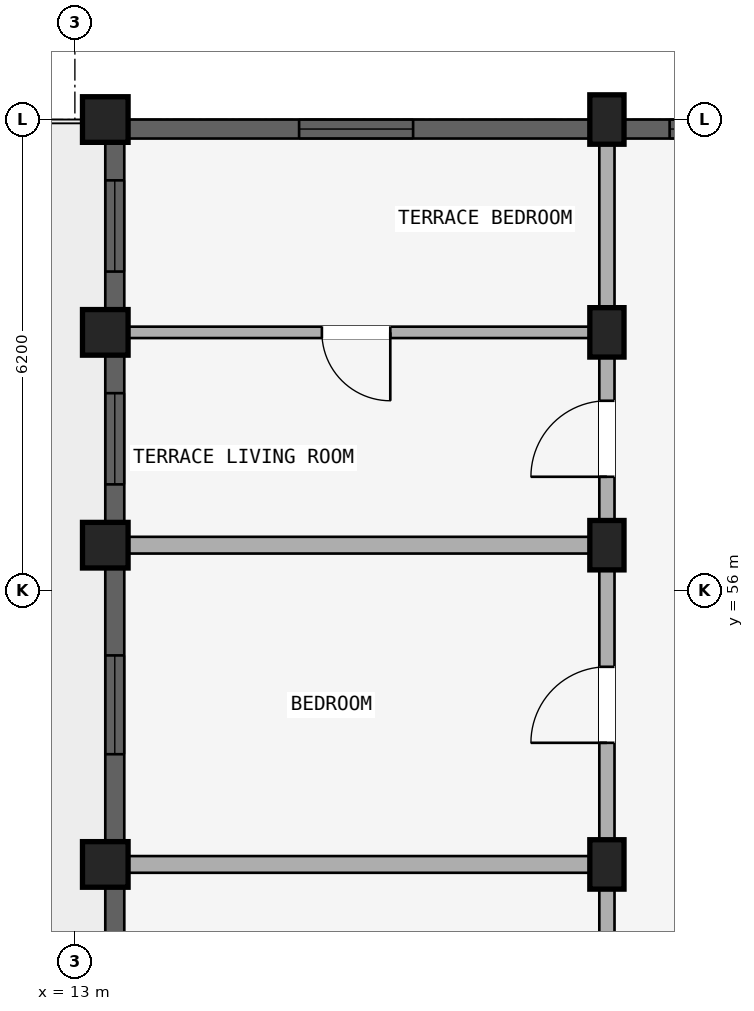
"""IFC4 building model, lengths in metres.
Left out: names, types, materials, properties, quantities, classifications, styles, units other than length and angle.
Written with IfcOpenShell. Run it as: python <this file> out.ifc"""

import sys

from ifc_helpers import new_model, si_unit, direction, frame, frame_2d, origin, origin_2d, place, context, subcontext, project, spatial, rectangle, extrude, element, fill, save


model = new_model("IFC4")
c1 = context("Model", 3, precision=1e-05, world=origin(), true_north=direction((0.0, 1.0)))
c2 = subcontext(c1, "Body", "Model", "MODEL_VIEW")
j1 = project(units=[si_unit("LENGTHUNIT", "METRE"), si_unit("PLANEANGLEUNIT", "RADIAN")], contexts=[c1])
p1 = place(None, origin())
s1 = spatial("IfcSite", under=j1, at=p1, CompositionType="ELEMENT")
p2 = place(p1, origin())
s2 = spatial("IfcBuilding", under=s1, at=p2, CompositionType="ELEMENT")
p3 = place(p2, frame((0.0, 0.0, 30.75)))
s3 = spatial("IfcBuildingStorey", under=s2, at=p3, CompositionType="ELEMENT", Elevation=30.75)
p4 = place(p3, frame((20.0, 52.4, 0.0), z_axis=(0.0, 0.0, 1.0), x_axis=(1.0, 0.0, 0.0)))
e1 = element("IfcColumn", 1, at=p4, inside=s3, PredefinedType="COLUMN", context=c2, shape_type="SweptSolid", body=[
    extrude(rectangle(XDim=0.45, YDim=0.65, at=origin_2d()), origin(), (0.0, 0.0, 1.0), 2.91),
])
p5 = place(p3, frame((13.4, 52.4, 0.0), z_axis=(0.0, 0.0, 1.0), x_axis=(1.0, 0.0, 0.0)))
e2 = element("IfcColumn", 2, at=p5, inside=s3, PredefinedType="COLUMN", context=c2, shape_type="SweptSolid", body=[
    extrude(rectangle(XDim=0.6, YDim=0.6, at=origin_2d()), origin(), (0.0, 0.0, 1.0), 2.91),
])
p6 = place(p3, frame((20.0, 56.6, 0.0), z_axis=(0.0, 0.0, 1.0), x_axis=(1.0, 0.0, 0.0)))
e3 = element("IfcColumn", 3, at=p6, inside=s3, PredefinedType="COLUMN", context=c2, shape_type="SweptSolid", body=[
    extrude(rectangle(XDim=0.45, YDim=0.65, at=origin_2d()), origin(), (0.0, 0.0, 1.0), 2.91),
])
p7 = place(p3, frame((13.4, 56.6, 0.0), z_axis=(0.0, 0.0, 1.0), x_axis=(1.0, 0.0, 0.0)))
e4 = element("IfcColumn", 4, at=p7, inside=s3, PredefinedType="COLUMN", context=c2, shape_type="SweptSolid", body=[
    extrude(rectangle(XDim=0.6, YDim=0.6, at=origin_2d()), origin(), (0.0, 0.0, 1.0), 2.91),
])
p8 = place(p3, frame((20.0, 59.4, 0.0), z_axis=(0.0, 0.0, 1.0), x_axis=(1.0, 0.0, 0.0)))
e5 = element("IfcColumn", 5, at=p8, inside=s3, PredefinedType="COLUMN", context=c2, shape_type="SweptSolid", body=[
    extrude(rectangle(XDim=0.45, YDim=0.65, at=origin_2d()), origin(), (0.0, 0.0, 1.0), 2.91),
])
p9 = place(p3, frame((13.4, 59.4, 0.0), z_axis=(0.0, 0.0, 1.0), x_axis=(1.0, 0.0, 0.0)))
e6 = element("IfcColumn", 6, at=p9, inside=s3, PredefinedType="COLUMN", context=c2, shape_type="SweptSolid", body=[
    extrude(rectangle(XDim=0.6, YDim=0.6, at=origin_2d()), origin(), (0.0, 0.0, 1.0), 2.91),
])
p10 = place(p3, frame((20.0, 62.2, 0.0), z_axis=(0.0, 0.0, 1.0), x_axis=(1.0, 0.0, 0.0)))
e7 = element("IfcColumn", 7, at=p10, inside=s3, PredefinedType="COLUMN", context=c2, shape_type="SweptSolid", body=[
    extrude(rectangle(XDim=0.45, YDim=0.65, at=origin_2d()), origin(), (0.0, 0.0, 1.0), 2.91),
])
p11 = place(p3, frame((13.4, 62.2, 0.0), z_axis=(0.0, 0.0, 1.0), x_axis=(1.0, 0.0, 0.0)))
e8 = element("IfcColumn", 8, at=p11, inside=s3, PredefinedType="COLUMN", context=c2, shape_type="SweptSolid", body=[
    extrude(rectangle(XDim=0.6, YDim=0.6, at=origin_2d()), origin(), (0.0, 0.0, 1.0), 2.91),
])
p12 = place(p3, frame((20.0, 48.35, 0.0), z_axis=(0.0, 0.0, 1.0), x_axis=(0.0, 1.0, 0.0)))
e9 = element("IfcWall", 9, at=p12, inside=s3, PredefinedType="STANDARD", context=c2, shape_type="SweptSolid", body=[
    extrude(rectangle(XDim=4.05, YDim=0.2, at=frame_2d((2.025, 0.0))), origin(), (0.0, 0.0, 1.0), 2.352),
])
p13 = place(p12, frame((1.525, 0.0, 0.0)))
e10 = element("IfcOpeningElement", 10, at=p13, cuts=e9, PredefinedType="OPENING", context=c2, shape_type="SweptSolid", body=[
    extrude(rectangle(XDim=1.0, YDim=2.15, at=frame_2d((0.5, 1.075))), frame((0.0, 0.11, 0.0), z_axis=(0.0, -1.0, 0.0), x_axis=(1.0, 0.0, 0.0)), (0.0, 0.0, 1.0), 0.22),
])
p14 = place(p3, frame((20.0, 52.4, 0.0), z_axis=(0.0, 0.0, 1.0), x_axis=(0.0, 1.0, 0.0)))
e11 = element("IfcWall", 11, at=p14, inside=s3, PredefinedType="STANDARD", context=c2, shape_type="SweptSolid", body=[
    extrude(rectangle(XDim=4.2, YDim=0.2, at=frame_2d((2.1, 0.0))), origin(), (0.0, 0.0, 1.0), 2.352),
])
p15 = place(p14, frame((1.6, 0.0, 0.0)))
e12 = element("IfcOpeningElement", 12, at=p15, cuts=e11, PredefinedType="OPENING", context=c2, shape_type="SweptSolid", body=[
    extrude(rectangle(XDim=1.0, YDim=2.15, at=frame_2d((0.5, 1.075))), frame((0.0, 0.11, 0.0), z_axis=(0.0, -1.0, 0.0), x_axis=(1.0, 0.0, 0.0)), (0.0, 0.0, 1.0), 0.22),
])
p16 = place(p3, frame((19.95, 52.4, 0.0), z_axis=(0.0, 0.0, 1.0), x_axis=(-1.0, 0.0, 0.0)))
e13 = element("IfcWall", 13, at=p16, inside=s3, PredefinedType="STANDARD", context=c2, shape_type="SweptSolid", body=[
    extrude(rectangle(XDim=6.33, YDim=0.22, at=frame_2d((3.165, 0.0))), origin(), (0.0, 0.0, 1.0), 2.352),
])
p17 = place(p3, frame((20.0, 56.6, 0.0), z_axis=(0.0, 0.0, 1.0), x_axis=(0.0, 1.0, 0.0)))
e14 = element("IfcWall", 14, at=p17, inside=s3, PredefinedType="STANDARD", context=c2, shape_type="SweptSolid", body=[
    extrude(rectangle(XDim=2.8, YDim=0.2, at=frame_2d((1.4, 0.0))), origin(), (0.0, 0.0, 1.0), 2.352),
])
p18 = place(p17, frame((0.9, 0.0, 0.0)))
e15 = element("IfcOpeningElement", 15, at=p18, cuts=e14, PredefinedType="OPENING", context=c2, shape_type="SweptSolid", body=[
    extrude(rectangle(XDim=1.0, YDim=2.15, at=frame_2d((0.5, 1.075))), frame((0.0, 0.11, 0.0), z_axis=(0.0, -1.0, 0.0), x_axis=(1.0, 0.0, 0.0)), (0.0, 0.0, 1.0), 0.22),
])
p19 = place(p3, frame((19.9, 56.6, 0.0), z_axis=(0.0, 0.0, 1.0), x_axis=(-1.0, 0.0, 0.0)))
e16 = element("IfcWall", 16, at=p19, inside=s3, PredefinedType="STANDARD", context=c2, shape_type="SweptSolid", body=[
    extrude(rectangle(XDim=6.22, YDim=0.22, at=frame_2d((3.11, 0.0))), origin(), (0.0, 0.0, 1.0), 2.352),
])
p20 = place(p3, frame((20.0, 59.4, 0.0), z_axis=(0.0, 0.0, 1.0), x_axis=(0.0, 1.0, 0.0)))
e17 = element("IfcWall", 17, at=p20, inside=s3, PredefinedType="STANDARD", context=c2, shape_type="SweptSolid", body=[
    extrude(rectangle(XDim=2.8, YDim=0.2, at=frame_2d((1.4, 0.0))), origin(), (0.0, 0.0, 1.0), 2.352),
])
p21 = place(p3, frame((19.9, 59.4, 0.0), z_axis=(0.0, 0.0, 1.0), x_axis=(-1.0, 0.0, 0.0)))
e18 = element("IfcWall", 18, at=p21, inside=s3, PredefinedType="PARTITIONING", context=c2, shape_type="SweptSolid", body=[
    extrude(rectangle(XDim=6.22, YDim=0.15, at=frame_2d((3.11, 0.0))), origin(), (0.0, 0.0, 1.0), 2.352),
])
p22 = place(p21, frame((2.75, 0.0, 0.0)))
e19 = element("IfcOpeningElement", 19, at=p22, cuts=e18, PredefinedType="OPENING", context=c2, shape_type="SweptSolid", body=[
    extrude(rectangle(XDim=0.9, YDim=2.1, at=frame_2d((0.45, 1.05))), frame((0.0, 0.085, 0.0), z_axis=(0.0, -1.0, 0.0), x_axis=(1.0, 0.0, 0.0)), (0.0, 0.0, 1.0), 0.17),
])
p23 = place(p3, frame((13.525, 48.503, 0.0), z_axis=(0.0, 0.0, 1.0), x_axis=(0.0, 1.0, 0.0)))
e20 = element("IfcWall", 20, at=p23, inside=s3, PredefinedType="STANDARD", context=c2, shape_type="SweptSolid", body=[
    extrude(rectangle(XDim=3.593, YDim=0.25, at=frame_2d((1.796, 0.0))), origin(), (0.0, 0.0, 1.0), 2.452),
])
p24 = place(p23, frame((1.146, 0.0, 0.852)))
e21 = element("IfcOpeningElement", 21, at=p24, cuts=e20, PredefinedType="OPENING", context=c2, shape_type="SweptSolid", body=[
    extrude(rectangle(XDim=1.3, YDim=1.4, at=frame_2d((0.65, 0.7))), frame((0.0, 0.135, 0.0), z_axis=(0.0, -1.0, 0.0), x_axis=(1.0, 0.0, 0.0)), (0.0, 0.0, 1.0), 0.27),
])
p25 = place(p3, frame((13.525, 52.704, 0.0), z_axis=(0.0, 0.0, 1.0), x_axis=(0.0, 1.0, 0.0)))
e22 = element("IfcWall", 22, at=p25, inside=s3, PredefinedType="STANDARD", context=c2, shape_type="SweptSolid", body=[
    extrude(rectangle(XDim=3.593, YDim=0.25, at=frame_2d((1.796, 0.0))), origin(), (0.0, 0.0, 1.0), 2.452),
])
p26 = place(p25, frame((1.146, 0.0, 0.852)))
e23 = element("IfcOpeningElement", 23, at=p26, cuts=e22, PredefinedType="OPENING", context=c2, shape_type="SweptSolid", body=[
    extrude(rectangle(XDim=1.3, YDim=1.4, at=frame_2d((0.65, 0.7))), frame((0.0, 0.135, 0.0), z_axis=(0.0, -1.0, 0.0), x_axis=(1.0, 0.0, 0.0)), (0.0, 0.0, 1.0), 0.27),
])
p27 = place(p3, frame((13.525, 56.904, 0.0), z_axis=(0.0, 0.0, 1.0), x_axis=(0.0, 1.0, 0.0)))
e24 = element("IfcWall", 24, at=p27, inside=s3, PredefinedType="STANDARD", context=c2, shape_type="SweptSolid", body=[
    extrude(rectangle(XDim=2.193, YDim=0.25, at=frame_2d((1.096, 0.0))), origin(), (0.0, 0.0, 1.0), 2.452),
])
p28 = place(p27, frame((0.497, 0.0, 0.752)))
e25 = element("IfcOpeningElement", 25, at=p28, cuts=e24, PredefinedType="OPENING", context=c2, shape_type="SweptSolid", body=[
    extrude(rectangle(XDim=1.2, YDim=1.5, at=frame_2d((0.6, 0.75))), frame((0.0, 0.135, 0.0), z_axis=(0.0, -1.0, 0.0), x_axis=(1.0, 0.0, 0.0)), (0.0, 0.0, 1.0), 0.27),
])
p29 = place(p3, frame((13.525, 59.704, 0.0), z_axis=(0.0, 0.0, 1.0), x_axis=(0.0, 1.0, 0.0)))
e26 = element("IfcWall", 26, at=p29, inside=s3, PredefinedType="STANDARD", context=c2, shape_type="SweptSolid", body=[
    extrude(rectangle(XDim=2.193, YDim=0.25, at=frame_2d((1.096, 0.0))), origin(), (0.0, 0.0, 1.0), 2.452),
])
p30 = place(p29, frame((0.497, 0.0, 0.752)))
e27 = element("IfcOpeningElement", 27, at=p30, cuts=e26, PredefinedType="OPENING", context=c2, shape_type="SweptSolid", body=[
    extrude(rectangle(XDim=1.2, YDim=1.5, at=frame_2d((0.6, 0.75))), frame((0.0, 0.135, 0.0), z_axis=(0.0, -1.0, 0.0), x_axis=(1.0, 0.0, 0.0)), (0.0, 0.0, 1.0), 0.27),
])
p31 = place(p3, frame((22.171, 62.075, 0.0), z_axis=(0.0, 0.0, 1.0), x_axis=(-1.0, 0.0, 0.0)))
e28 = element("IfcWall", 28, at=p31, inside=s3, PredefinedType="STANDARD", context=c2, shape_type="SweptSolid", body=[
    extrude(rectangle(XDim=1.943, YDim=0.25, at=frame_2d((0.971, 0.0))), origin(), (0.0, 0.0, 1.0), 2.352),
])
p32 = place(p31, frame((0.596, 0.0, 0.88)))
e29 = element("IfcOpeningElement", 29, at=p32, cuts=e28, PredefinedType="OPENING", context=c2, shape_type="SweptSolid", body=[
    extrude(rectangle(XDim=0.75, YDim=1.05, at=frame_2d((0.375, 0.525))), frame((0.0, 0.135, 0.0), z_axis=(0.0, -1.0, 0.0), x_axis=(1.0, 0.0, 0.0)), (0.0, 0.0, 1.0), 0.27),
])
p33 = place(p3, frame((19.771, 62.075, 0.0), z_axis=(0.0, 0.0, 1.0), x_axis=(-1.0, 0.0, 0.0)))
e30 = element("IfcWall", 30, at=p33, inside=s3, PredefinedType="STANDARD", context=c2, shape_type="SweptSolid", body=[
    extrude(rectangle(XDim=6.068, YDim=0.25, at=frame_2d((3.034, 0.0))), origin(), (0.0, 0.0, 1.0), 2.46),
])
p34 = place(p33, frame((2.322, 0.0, 0.61)))
e31 = element("IfcOpeningElement", 31, at=p34, cuts=e30, PredefinedType="OPENING", context=c2, shape_type="SweptSolid", body=[
    extrude(rectangle(XDim=1.5, YDim=1.65, at=frame_2d((0.75, 0.825))), frame((0.0, 0.135, 0.0), z_axis=(0.0, -1.0, 0.0), x_axis=(1.0, 0.0, 0.0)), (0.0, 0.0, 1.0), 0.27),
])
p35 = place(p26, origin())
e32 = element("IfcWindow", 32, at=p35, inside=s3, PartitioningType="DOUBLE_PANEL_HORIZONTAL", PredefinedType="WINDOW", context=c2, shape_type="SweptSolid", body=[
    extrude(rectangle(XDim=1.3, YDim=1.4, at=frame_2d((0.65, 0.7))), frame((0.0, 0.03, 0.0), z_axis=(0.0, -1.0, 0.0), x_axis=(1.0, 0.0, 0.0)), (0.0, 0.0, 1.0), 0.06),
])
fill(e23, e32)
p36 = place(p28, origin())
e33 = element("IfcWindow", 33, at=p36, inside=s3, PartitioningType="SINGLE_PANEL", PredefinedType="WINDOW", context=c2, shape_type="SweptSolid", body=[
    extrude(rectangle(XDim=1.2, YDim=1.5, at=frame_2d((0.6, 0.75))), frame((0.0, 0.03, 0.0), z_axis=(0.0, -1.0, 0.0), x_axis=(1.0, 0.0, 0.0)), (0.0, 0.0, 1.0), 0.06),
])
fill(e25, e33)
p37 = place(p30, origin())
e34 = element("IfcWindow", 34, at=p37, inside=s3, PartitioningType="SINGLE_PANEL", PredefinedType="WINDOW", context=c2, shape_type="SweptSolid", body=[
    extrude(rectangle(XDim=1.2, YDim=1.5, at=frame_2d((0.6, 0.75))), frame((0.0, 0.03, 0.0), z_axis=(0.0, -1.0, 0.0), x_axis=(1.0, 0.0, 0.0)), (0.0, 0.0, 1.0), 0.06),
])
fill(e27, e34)
p38 = place(p32, origin())
e35 = element("IfcWindow", 35, at=p38, inside=s3, PartitioningType="SINGLE_PANEL", PredefinedType="WINDOW", context=c2, shape_type="SweptSolid", body=[
    extrude(rectangle(XDim=0.75, YDim=1.05, at=frame_2d((0.375, 0.525))), frame((0.0, 0.03, 0.0), z_axis=(0.0, -1.0, 0.0), x_axis=(1.0, 0.0, 0.0)), (0.0, 0.0, 1.0), 0.06),
])
fill(e29, e35)
p39 = place(p34, origin())
e36 = element("IfcWindow", 36, at=p39, inside=s3, PartitioningType="DOUBLE_PANEL_VERTICAL", PredefinedType="WINDOW", context=c2, shape_type="SweptSolid", body=[
    extrude(rectangle(XDim=1.5, YDim=1.65, at=frame_2d((0.75, 0.825))), frame((0.0, 0.03, 0.0), z_axis=(0.0, -1.0, 0.0), x_axis=(1.0, 0.0, 0.0)), (0.0, 0.0, 1.0), 0.06),
])
fill(e31, e36)
p40 = place(p15, origin())
e37 = element("IfcDoor", 37, at=p40, inside=s3, OperationType="SINGLE_SWING_LEFT", PredefinedType="DOOR", context=c2, shape_type="SweptSolid", body=[
    extrude(rectangle(XDim=1.0, YDim=2.15, at=frame_2d((0.5, 1.075))), frame((0.0, 0.025, 0.0), z_axis=(0.0, -1.0, 0.0), x_axis=(1.0, 0.0, 0.0)), (0.0, 0.0, 1.0), 0.05),
])
fill(e12, e37)
p41 = place(p18, origin())
e38 = element("IfcDoor", 38, at=p41, inside=s3, OperationType="SINGLE_SWING_LEFT", PredefinedType="DOOR", context=c2, shape_type="SweptSolid", body=[
    extrude(rectangle(XDim=1.0, YDim=2.15, at=frame_2d((0.5, 1.075))), frame((0.0, 0.025, 0.0), z_axis=(0.0, -1.0, 0.0), x_axis=(1.0, 0.0, 0.0)), (0.0, 0.0, 1.0), 0.05),
])
fill(e15, e38)
p42 = place(p22, origin())
e39 = element("IfcDoor", 39, at=p42, inside=s3, OperationType="SINGLE_SWING_LEFT", PredefinedType="DOOR", context=c2, shape_type="SweptSolid", body=[
    extrude(rectangle(XDim=0.9, YDim=2.1, at=frame_2d((0.45, 1.05))), frame((0.0, 0.025, 0.0), z_axis=(0.0, -1.0, 0.0), x_axis=(1.0, 0.0, 0.0)), (0.0, 0.0, 1.0), 0.05),
])
fill(e19, e39)
save(model, sys.argv[1])
